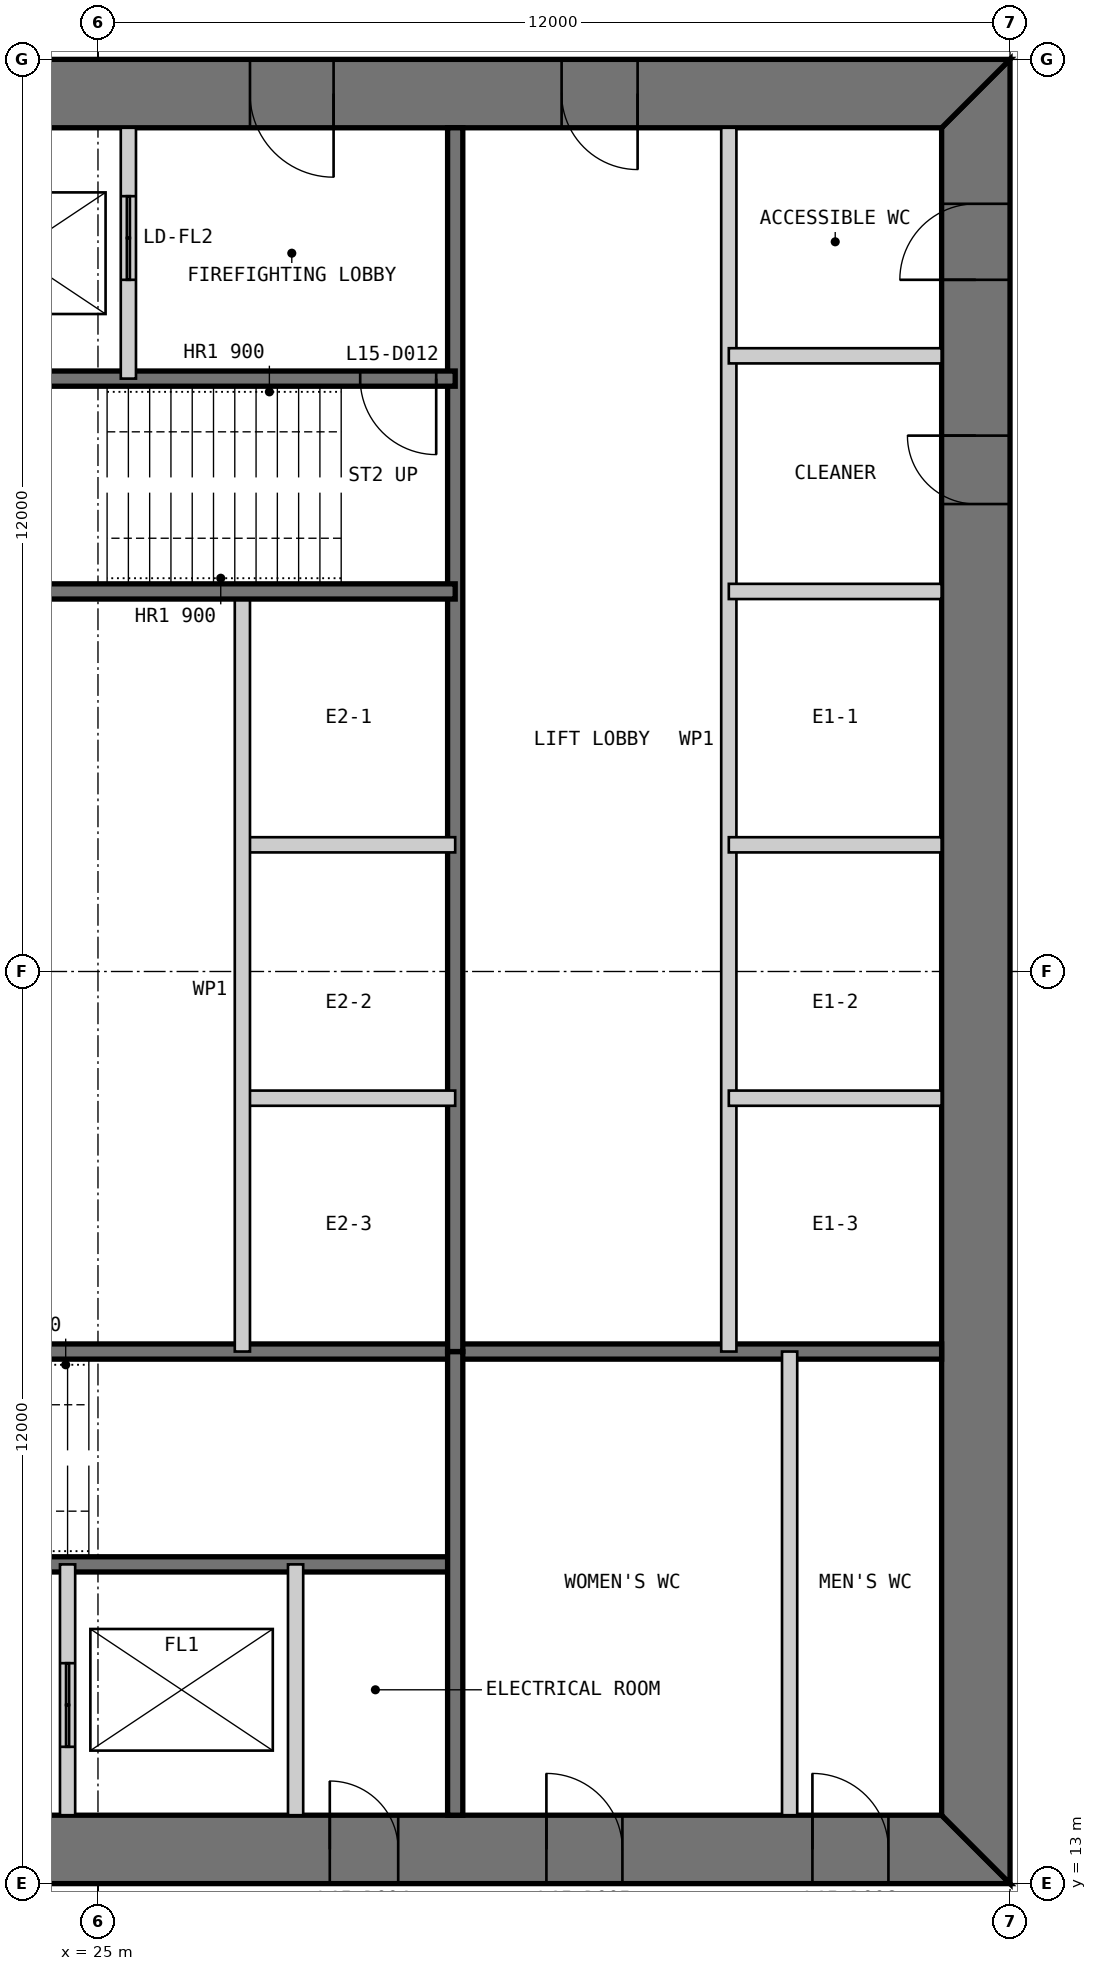
"""IFC4 building model, lengths in metres.
Left out: names, types, materials, properties, quantities, classifications, styles, units other than length and angle.
Written with IfcOpenShell. Run it as: python <this file> out.ifc"""

import sys

from ifc_helpers import new_model, si_unit, direction, frame, frame_2d, origin, place, context, subcontext, project, spatial, polyline, rectangle, outline, extrude, element, fill, save


model = new_model("IFC4")
c1 = context("Model", 3, precision=1e-05, world=origin(), true_north=direction((0.0, 1.0)))
c2 = subcontext(c1, "Body", "Model", "MODEL_VIEW")
j1 = project(units=[si_unit("LENGTHUNIT", "METRE"), si_unit("PLANEANGLEUNIT", "RADIAN")], contexts=[c1])
p1 = place(None, origin())
s1 = spatial("IfcSite", under=j1, at=p1, CompositionType="ELEMENT")
p2 = place(p1, origin())
s2 = spatial("IfcBuilding", under=s1, at=p2, CompositionType="ELEMENT")
p3 = place(p2, frame((0.0, 0.0, 67.0)))
s3 = spatial("IfcBuildingStorey", under=s2, at=p3, CompositionType="ELEMENT", Elevation=67.0)
p4 = place(p3, frame((13.0, 13.45, 0.0), z_axis=(0.0, 0.0, 1.0), x_axis=(1.0, 0.0, 0.0)))
e1 = element("IfcWall", 1, at=p4, inside=s3, PredefinedType="SHEAR", context=c2, shape_type="SweptSolid", body=[
    extrude(outline(polyline([(0.0, -0.45), (24.0, -0.45), (23.1, 0.45), (0.9, 0.45), (0.0, -0.45)])), origin(), (0.0, 0.0, 1.0), 4.0),
])
p5 = place(p4, frame((4.9, 0.0, 0.0)))
e2 = element("IfcOpeningElement", 2, at=p5, cuts=e1, PredefinedType="OPENING", context=c2, shape_type="SweptSolid", body=[
    extrude(rectangle(XDim=1.0, YDim=2.2, at=frame_2d((0.5, 1.1))), frame((0.0, 0.46, 0.0), z_axis=(0.0, -1.0, 0.0), x_axis=(1.0, 0.0, 0.0)), (0.0, 0.0, 1.0), 0.92),
])
p6 = place(p4, frame((8.9, 0.0, 0.0)))
e3 = element("IfcOpeningElement", 3, at=p6, cuts=e1, PredefinedType="OPENING", context=c2, shape_type="SweptSolid", body=[
    extrude(rectangle(XDim=1.1, YDim=2.2, at=frame_2d((0.55, 1.1))), frame((0.0, 0.46, 0.0), z_axis=(0.0, -1.0, 0.0), x_axis=(1.0, 0.0, 0.0)), (0.0, 0.0, 1.0), 0.92),
])
p7 = place(p4, frame((15.05, 0.0, 0.0)))
e4 = element("IfcOpeningElement", 4, at=p7, cuts=e1, PredefinedType="OPENING", context=c2, shape_type="SweptSolid", body=[
    extrude(rectangle(XDim=0.9, YDim=2.2, at=frame_2d((0.45, 1.1))), frame((0.0, 0.46, 0.0), z_axis=(0.0, -1.0, 0.0), x_axis=(1.0, 0.0, 0.0)), (0.0, 0.0, 1.0), 0.92),
])
p8 = place(p4, frame((17.9, 0.0, 0.0)))
e5 = element("IfcOpeningElement", 5, at=p8, cuts=e1, PredefinedType="OPENING", context=c2, shape_type="SweptSolid", body=[
    extrude(rectangle(XDim=1.0, YDim=2.2, at=frame_2d((0.5, 1.1))), frame((0.0, 0.46, 0.0), z_axis=(0.0, -1.0, 0.0), x_axis=(1.0, 0.0, 0.0)), (0.0, 0.0, 1.0), 0.92),
])
p9 = place(p4, frame((21.4, 0.0, 0.0)))
e6 = element("IfcOpeningElement", 6, at=p9, cuts=e1, PredefinedType="OPENING", context=c2, shape_type="SweptSolid", body=[
    extrude(rectangle(XDim=1.0, YDim=2.2, at=frame_2d((0.5, 1.1))), frame((0.0, 0.46, 0.0), z_axis=(0.0, -1.0, 0.0), x_axis=(1.0, 0.0, 0.0)), (0.0, 0.0, 1.0), 0.92),
])
p10 = place(p3, frame((36.55, 13.9, 0.0), z_axis=(0.0, 0.0, 1.0), x_axis=(0.0, 1.0, 0.0)))
e7 = element("IfcWall", 7, at=p10, inside=s3, PredefinedType="SHEAR", context=c2, shape_type="SweptSolid", body=[
    extrude(outline(polyline([(-0.9, -0.45), (23.1, -0.45), (22.2, 0.45), (0.0, 0.45), (-0.9, -0.45)])), origin(), (0.0, 0.0, 1.0), 4.0),
])
p11 = place(p10, frame((20.2, 0.0, 0.0)))
e8 = element("IfcOpeningElement", 8, at=p11, cuts=e7, PredefinedType="OPENING", context=c2, shape_type="SweptSolid", body=[
    extrude(rectangle(XDim=1.0, YDim=2.2, at=frame_2d((0.5, 1.1))), frame((0.0, 0.46, 0.0), z_axis=(0.0, -1.0, 0.0), x_axis=(1.0, 0.0, 0.0)), (0.0, 0.0, 1.0), 0.92),
])
p12 = place(p10, frame((17.25, 0.0, 0.0)))
e9 = element("IfcOpeningElement", 9, at=p12, cuts=e7, PredefinedType="OPENING", context=c2, shape_type="SweptSolid", body=[
    extrude(rectangle(XDim=0.9, YDim=2.2, at=frame_2d((0.45, 1.1))), frame((0.0, 0.46, 0.0), z_axis=(0.0, -1.0, 0.0), x_axis=(1.0, 0.0, 0.0)), (0.0, 0.0, 1.0), 0.92),
])
p13 = place(p3, frame((37.0, 36.55, 0.0), z_axis=(0.0, 0.0, 1.0), x_axis=(-1.0, 0.0, 0.0)))
e10 = element("IfcWall", 10, at=p13, inside=s3, PredefinedType="SHEAR", context=c2, shape_type="SweptSolid", body=[
    extrude(outline(polyline([(0.0, -0.45), (24.0, -0.45), (23.1, 0.45), (0.9, 0.45), (0.0, -0.45)])), origin(), (0.0, 0.0, 1.0), 4.0),
])
p14 = place(p13, frame((4.9, 0.0, 0.0)))
e11 = element("IfcOpeningElement", 11, at=p14, cuts=e10, PredefinedType="OPENING", context=c2, shape_type="SweptSolid", body=[
    extrude(rectangle(XDim=1.0, YDim=2.2, at=frame_2d((0.5, 1.1))), frame((0.0, 0.46, 0.0), z_axis=(0.0, -1.0, 0.0), x_axis=(1.0, 0.0, 0.0)), (0.0, 0.0, 1.0), 0.92),
])
p15 = place(p13, frame((8.9, 0.0, 0.0)))
e12 = element("IfcOpeningElement", 12, at=p15, cuts=e10, PredefinedType="OPENING", context=c2, shape_type="SweptSolid", body=[
    extrude(rectangle(XDim=1.1, YDim=2.2, at=frame_2d((0.55, 1.1))), frame((0.0, 0.46, 0.0), z_axis=(0.0, -1.0, 0.0), x_axis=(1.0, 0.0, 0.0)), (0.0, 0.0, 1.0), 0.92),
])
p16 = place(p13, frame((15.05, 0.0, 0.0)))
e13 = element("IfcOpeningElement", 13, at=p16, cuts=e10, PredefinedType="OPENING", context=c2, shape_type="SweptSolid", body=[
    extrude(rectangle(XDim=0.9, YDim=2.2, at=frame_2d((0.45, 1.1))), frame((0.0, 0.46, 0.0), z_axis=(0.0, -1.0, 0.0), x_axis=(1.0, 0.0, 0.0)), (0.0, 0.0, 1.0), 0.92),
])
p17 = place(p13, frame((17.9, 0.0, 0.0)))
e14 = element("IfcOpeningElement", 14, at=p17, cuts=e10, PredefinedType="OPENING", context=c2, shape_type="SweptSolid", body=[
    extrude(rectangle(XDim=1.0, YDim=2.2, at=frame_2d((0.5, 1.1))), frame((0.0, 0.46, 0.0), z_axis=(0.0, -1.0, 0.0), x_axis=(1.0, 0.0, 0.0)), (0.0, 0.0, 1.0), 0.92),
])
p18 = place(p13, frame((21.4, 0.0, 0.0)))
e15 = element("IfcOpeningElement", 15, at=p18, cuts=e10, PredefinedType="OPENING", context=c2, shape_type="SweptSolid", body=[
    extrude(rectangle(XDim=1.0, YDim=2.2, at=frame_2d((0.5, 1.1))), frame((0.0, 0.46, 0.0), z_axis=(0.0, -1.0, 0.0), x_axis=(1.0, 0.0, 0.0)), (0.0, 0.0, 1.0), 0.92),
])
p19 = place(p3, frame((20.3, 17.2, 0.0), z_axis=(0.0, 0.0, 1.0), x_axis=(1.0, 0.0, 0.0)))
e16 = element("IfcWall", 16, at=p19, inside=s3, PredefinedType="SOLIDWALL", context=c2, shape_type="SweptSolid", body=[
    extrude(rectangle(XDim=9.4, YDim=0.2, at=frame_2d((4.7, 0.0))), origin(), (0.0, 0.0, 1.0), 3.8),
])
p20 = place(p19, frame((0.25, 0.0, 0.0)))
e17 = element("IfcOpeningElement", 17, at=p20, cuts=e16, PredefinedType="OPENING", context=c2, shape_type="SweptSolid", body=[
    extrude(rectangle(XDim=1.0, YDim=2.2, at=frame_2d((0.5, 1.1))), frame((0.0, 0.11, 0.0), z_axis=(0.0, -1.0, 0.0), x_axis=(1.0, 0.0, 0.0)), (0.0, 0.0, 1.0), 0.22),
])
p21 = place(p3, frame((20.3, 20.0, 0.0), z_axis=(0.0, 0.0, 1.0), x_axis=(1.0, 0.0, 0.0)))
e18 = element("IfcWall", 18, at=p21, inside=s3, PredefinedType="SOLIDWALL", context=c2, shape_type="SweptSolid", body=[
    extrude(rectangle(XDim=15.8, YDim=0.2, at=frame_2d((7.9, 0.0))), origin(), (0.0, 0.0, 1.0), 3.8),
])
p22 = place(p3, frame((24.6, 13.9, 0.0), z_axis=(0.0, 0.0, 1.0), x_axis=(0.0, 1.0, 0.0)))
e19 = element("IfcWall", 19, at=p22, inside=s3, PredefinedType="PARTITIONING", context=c2, shape_type="SweptSolid", body=[
    extrude(rectangle(XDim=3.3, YDim=0.2, at=frame_2d((1.65, 0.0))), origin(), (0.0, 0.0, 1.0), 3.8),
])
p23 = place(p22, frame((0.9, 0.0, 0.0)))
e20 = element("IfcOpeningElement", 20, at=p23, cuts=e19, PredefinedType="OPENING", context=c2, shape_type="SweptSolid", body=[
    extrude(rectangle(XDim=1.1, YDim=2.2, at=frame_2d((0.55, 1.1))), frame((0.0, 0.11, 0.0), z_axis=(0.0, -1.0, 0.0), x_axis=(1.0, 0.0, 0.0)), (0.0, 0.0, 1.0), 0.22),
])
p24 = place(p3, frame((27.6, 13.9, 0.0), z_axis=(0.0, 0.0, 1.0), x_axis=(0.0, 1.0, 0.0)))
e21 = element("IfcWall", 21, at=p24, inside=s3, PredefinedType="PARTITIONING", context=c2, shape_type="SweptSolid", body=[
    extrude(rectangle(XDim=3.3, YDim=0.2, at=frame_2d((1.65, 0.0))), origin(), (0.0, 0.0, 1.0), 3.8),
])
p25 = place(p3, frame((29.7, 13.9, 0.0), z_axis=(0.0, 0.0, 1.0), x_axis=(0.0, 1.0, 0.0)))
e22 = element("IfcWall", 22, at=p25, inside=s3, PredefinedType="SOLIDWALL", context=c2, shape_type="SweptSolid", body=[
    extrude(rectangle(XDim=6.1, YDim=0.2, at=frame_2d((3.05, 0.0))), origin(), (0.0, 0.0, 1.0), 3.8),
])
p26 = place(p3, frame((34.1, 13.9, 0.0), z_axis=(0.0, 0.0, 1.0), x_axis=(0.0, 1.0, 0.0)))
e23 = element("IfcWall", 23, at=p26, inside=s3, PredefinedType="PARTITIONING", context=c2, shape_type="SweptSolid", body=[
    extrude(rectangle(XDim=6.1, YDim=0.2, at=frame_2d((3.05, 0.0))), origin(), (0.0, 0.0, 1.0), 3.8),
])
p27 = place(p3, frame((33.3, 36.1, 0.0), z_axis=(0.0, 0.0, 1.0), x_axis=(0.0, -1.0, 0.0)))
e24 = element("IfcWall", 24, at=p27, inside=s3, PredefinedType="PARTITIONING", context=c2, shape_type="SweptSolid", body=[
    extrude(rectangle(XDim=16.1, YDim=0.2, at=frame_2d((8.05, 0.0))), origin(), (0.0, 0.0, 1.0), 3.8),
])
p28 = place(p3, frame((29.7, 36.1, 0.0), z_axis=(0.0, 0.0, 1.0), x_axis=(0.0, -1.0, 0.0)))
e25 = element("IfcWall", 25, at=p28, inside=s3, PredefinedType="SOLIDWALL", context=c2, shape_type="SweptSolid", body=[
    extrude(rectangle(XDim=16.1, YDim=0.2, at=frame_2d((8.05, 0.0))), origin(), (0.0, 0.0, 1.0), 3.8),
])
for number, where, z_axis, x_axis in (
    (26, (36.1, 30.0, 0.0), (0.0, 0.0, 1.0), (-1.0, 0.0, 0.0)),
    (27, (36.1, 26.667, 0.0), (0.0, 0.0, 1.0), (-1.0, 0.0, 0.0)),
    (28, (36.1, 23.333, 0.0), (0.0, 0.0, 1.0), (-1.0, 0.0, 0.0)),
    (29, (29.7, 26.667, 0.0), (0.0, 0.0, 1.0), (-1.0, 0.0, 0.0)),
    (30, (29.7, 23.333, 0.0), (0.0, 0.0, 1.0), (-1.0, 0.0, 0.0)),
):
    element("IfcWall", number, at=place(p3, frame(where, z_axis=z_axis, x_axis=x_axis)), inside=s3, PredefinedType="PARTITIONING", context=c2, shape_type="SweptSolid", body=[
        extrude(rectangle(XDim=2.8, YDim=0.2, at=frame_2d((1.4, 0.0))), origin(), (0.0, 0.0, 1.0), 3.8),
    ])
p29 = place(p3, frame((26.9, 30.0, 0.0), z_axis=(0.0, 0.0, 1.0), x_axis=(0.0, -1.0, 0.0)))
e31 = element("IfcWall", 31, at=p29, inside=s3, PredefinedType="PARTITIONING", context=c2, shape_type="SweptSolid", body=[
    extrude(rectangle(XDim=10.0, YDim=0.2, at=frame_2d((5.0, 0.0))), origin(), (0.0, 0.0, 1.0), 3.8),
])
p30 = place(p3, frame((29.7, 32.8, 0.0), z_axis=(0.0, 0.0, 1.0), x_axis=(-1.0, 0.0, 0.0)))
e32 = element("IfcWall", 32, at=p30, inside=s3, PredefinedType="SOLIDWALL", context=c2, shape_type="SweptSolid", body=[
    extrude(rectangle(XDim=9.4, YDim=0.2, at=frame_2d((4.7, 0.0))), origin(), (0.0, 0.0, 1.0), 3.8),
])
p31 = place(p30, frame((0.25, 0.0, 0.0)))
e33 = element("IfcOpeningElement", 33, at=p31, cuts=e32, PredefinedType="OPENING", context=c2, shape_type="SweptSolid", body=[
    extrude(rectangle(XDim=1.0, YDim=2.2, at=frame_2d((0.5, 1.1))), frame((0.0, 0.11, 0.0), z_axis=(0.0, -1.0, 0.0), x_axis=(1.0, 0.0, 0.0)), (0.0, 0.0, 1.0), 0.22),
])
p32 = place(p3, frame((29.7, 30.0, 0.0), z_axis=(0.0, 0.0, 1.0), x_axis=(-1.0, 0.0, 0.0)))
e34 = element("IfcWall", 34, at=p32, inside=s3, PredefinedType="SOLIDWALL", context=c2, shape_type="SweptSolid", body=[
    extrude(rectangle(XDim=15.8, YDim=0.2, at=frame_2d((7.9, 0.0))), origin(), (0.0, 0.0, 1.0), 3.8),
])
p33 = place(p3, frame((25.4, 36.1, 0.0), z_axis=(0.0, 0.0, 1.0), x_axis=(0.0, -1.0, 0.0)))
e35 = element("IfcWall", 35, at=p33, inside=s3, PredefinedType="PARTITIONING", context=c2, shape_type="SweptSolid", body=[
    extrude(rectangle(XDim=3.3, YDim=0.2, at=frame_2d((1.65, 0.0))), origin(), (0.0, 0.0, 1.0), 3.8),
])
p34 = place(p33, frame((0.9, 0.0, 0.0)))
e36 = element("IfcOpeningElement", 36, at=p34, cuts=e35, PredefinedType="OPENING", context=c2, shape_type="SweptSolid", body=[
    extrude(rectangle(XDim=1.1, YDim=2.2, at=frame_2d((0.55, 1.1))), frame((0.0, 0.11, 0.0), z_axis=(0.0, -1.0, 0.0), x_axis=(1.0, 0.0, 0.0)), (0.0, 0.0, 1.0), 0.22),
])
p35 = place(p3, frame((36.1, 33.1, 0.0), z_axis=(0.0, 0.0, 1.0), x_axis=(-1.0, 0.0, 0.0)))
e37 = element("IfcWall", 37, at=p35, inside=s3, PredefinedType="PARTITIONING", context=c2, shape_type="SweptSolid", body=[
    extrude(rectangle(XDim=2.8, YDim=0.2, at=frame_2d((1.4, 0.0))), origin(), (0.0, 0.0, 1.0), 3.8),
])
p36 = place(p7, origin())
e38 = element("IfcDoor", 38, at=p36, inside=s3, OperationType="SINGLE_SWING_LEFT", PredefinedType="DOOR", context=c2, shape_type="SweptSolid", body=[
    extrude(rectangle(XDim=0.9, YDim=2.2, at=frame_2d((0.45, 1.1))), frame((0.0, 0.025, 0.0), z_axis=(0.0, -1.0, 0.0), x_axis=(1.0, 0.0, 0.0)), (0.0, 0.0, 1.0), 0.05),
    extrude(outline(polyline([(0.0, 0.0), (0.04, 0.0), (0.04, 2.16), (0.86, 2.16), (0.86, 0.0), (0.9, 0.0), (0.9, 2.2), (0.0, 2.2), (0.0, 0.0)])), frame((0.0, 0.3, 0.0), z_axis=(0.0, -1.0, 0.0), x_axis=(1.0, 0.0, 0.0)), (0.0, 0.0, 1.0), 0.6),
])
fill(e4, e38)
p37 = place(p8, origin())
e39 = element("IfcDoor", 39, at=p37, inside=s3, OperationType="SINGLE_SWING_LEFT", PredefinedType="DOOR", context=c2, shape_type="SweptSolid", body=[
    extrude(rectangle(XDim=1.0, YDim=2.2, at=frame_2d((0.5, 1.1))), frame((0.0, 0.025, 0.0), z_axis=(0.0, -1.0, 0.0), x_axis=(1.0, 0.0, 0.0)), (0.0, 0.0, 1.0), 0.05),
    extrude(outline(polyline([(0.0, 0.0), (0.04, 0.0), (0.04, 2.16), (0.96, 2.16), (0.96, 0.0), (1.0, 0.0), (1.0, 2.2), (0.0, 2.2), (0.0, 0.0)])), frame((0.0, 0.3, 0.0), z_axis=(0.0, -1.0, 0.0), x_axis=(1.0, 0.0, 0.0)), (0.0, 0.0, 1.0), 0.6),
])
fill(e5, e39)
p38 = place(p9, origin())
e40 = element("IfcDoor", 40, at=p38, inside=s3, OperationType="SINGLE_SWING_LEFT", PredefinedType="DOOR", context=c2, shape_type="SweptSolid", body=[
    extrude(rectangle(XDim=1.0, YDim=2.2, at=frame_2d((0.5, 1.1))), frame((0.0, 0.025, 0.0), z_axis=(0.0, -1.0, 0.0), x_axis=(1.0, 0.0, 0.0)), (0.0, 0.0, 1.0), 0.05),
    extrude(outline(polyline([(0.0, 0.0), (0.04, 0.0), (0.04, 2.16), (0.96, 2.16), (0.96, 0.0), (1.0, 0.0), (1.0, 2.2), (0.0, 2.2), (0.0, 0.0)])), frame((0.0, 0.3, 0.0), z_axis=(0.0, -1.0, 0.0), x_axis=(1.0, 0.0, 0.0)), (0.0, 0.0, 1.0), 0.6),
])
fill(e6, e40)
p39 = place(p14, origin())
e41 = element("IfcDoor", 41, at=p39, inside=s3, OperationType="SINGLE_SWING_LEFT", PredefinedType="DOOR", context=c2, shape_type="SweptSolid", body=[
    extrude(rectangle(XDim=1.0, YDim=2.2, at=frame_2d((0.5, 1.1))), frame((0.0, 0.025, 0.0), z_axis=(0.0, -1.0, 0.0), x_axis=(1.0, 0.0, 0.0)), (0.0, 0.0, 1.0), 0.05),
    extrude(outline(polyline([(0.0, 0.0), (0.04, 0.0), (0.04, 2.16), (0.96, 2.16), (0.96, 0.0), (1.0, 0.0), (1.0, 2.2), (0.0, 2.2), (0.0, 0.0)])), frame((0.0, 0.3, 0.0), z_axis=(0.0, -1.0, 0.0), x_axis=(1.0, 0.0, 0.0)), (0.0, 0.0, 1.0), 0.6),
])
fill(e11, e41)
p40 = place(p15, origin())
e42 = element("IfcDoor", 42, at=p40, inside=s3, OperationType="SINGLE_SWING_LEFT", PredefinedType="DOOR", context=c2, shape_type="SweptSolid", body=[
    extrude(rectangle(XDim=1.1, YDim=2.2, at=frame_2d((0.55, 1.1))), frame((0.0, 0.025, 0.0), z_axis=(0.0, -1.0, 0.0), x_axis=(1.0, 0.0, 0.0)), (0.0, 0.0, 1.0), 0.05),
    extrude(outline(polyline([(0.0, 0.0), (0.04, 0.0), (0.04, 2.16), (1.06, 2.16), (1.06, 0.0), (1.1, 0.0), (1.1, 2.2), (0.0, 2.2), (0.0, 0.0)])), frame((0.0, 0.3, 0.0), z_axis=(0.0, -1.0, 0.0), x_axis=(1.0, 0.0, 0.0)), (0.0, 0.0, 1.0), 0.6),
])
fill(e12, e42)
p41 = place(p31, origin())
e43 = element("IfcDoor", 43, at=p41, inside=s3, OperationType="SINGLE_SWING_LEFT", PredefinedType="DOOR", context=c2, shape_type="SweptSolid", body=[
    extrude(rectangle(XDim=1.0, YDim=2.2, at=frame_2d((0.5, 1.1))), frame((0.0, 0.025, 0.0), z_axis=(0.0, -1.0, 0.0), x_axis=(1.0, 0.0, 0.0)), (0.0, 0.0, 1.0), 0.05),
])
fill(e33, e43)
p42 = place(p11, origin())
e44 = element("IfcDoor", 44, at=p42, inside=s3, OperationType="SINGLE_SWING_LEFT", PredefinedType="DOOR", context=c2, shape_type="SweptSolid", body=[
    extrude(rectangle(XDim=1.0, YDim=2.2, at=frame_2d((0.5, 1.1))), frame((0.0, 0.025, 0.0), z_axis=(0.0, -1.0, 0.0), x_axis=(1.0, 0.0, 0.0)), (0.0, 0.0, 1.0), 0.05),
    extrude(outline(polyline([(0.0, 0.0), (0.04, 0.0), (0.04, 2.16), (0.96, 2.16), (0.96, 0.0), (1.0, 0.0), (1.0, 2.2), (0.0, 2.2), (0.0, 0.0)])), frame((0.0, 0.3, 0.0), z_axis=(0.0, -1.0, 0.0), x_axis=(1.0, 0.0, 0.0)), (0.0, 0.0, 1.0), 0.6),
])
fill(e8, e44)
p43 = place(p12, origin())
e45 = element("IfcDoor", 45, at=p43, inside=s3, OperationType="SINGLE_SWING_RIGHT", PredefinedType="DOOR", context=c2, shape_type="SweptSolid", body=[
    extrude(rectangle(XDim=0.9, YDim=2.2, at=frame_2d((0.45, 1.1))), frame((0.0, 0.025, 0.0), z_axis=(0.0, -1.0, 0.0), x_axis=(1.0, 0.0, 0.0)), (0.0, 0.0, 1.0), 0.05),
    extrude(outline(polyline([(0.0, 0.0), (0.04, 0.0), (0.04, 2.16), (0.86, 2.16), (0.86, 0.0), (0.9, 0.0), (0.9, 2.2), (0.0, 2.2), (0.0, 0.0)])), frame((0.0, 0.3, 0.0), z_axis=(0.0, -1.0, 0.0), x_axis=(1.0, 0.0, 0.0)), (0.0, 0.0, 1.0), 0.6),
])
fill(e9, e45)
p44 = place(p23, origin())
e46 = element("IfcDoor", 46, at=p44, inside=s3, OperationType="DOUBLE_DOOR_SLIDING", PredefinedType="DOOR", context=c2, shape_type="SweptSolid", body=[
    extrude(rectangle(XDim=1.1, YDim=2.2, at=frame_2d((0.55, 1.1))), frame((0.0, 0.025, 0.0), z_axis=(0.0, -1.0, 0.0), x_axis=(1.0, 0.0, 0.0)), (0.0, 0.0, 1.0), 0.05),
])
fill(e20, e46)
p45 = place(p34, origin())
e47 = element("IfcDoor", 47, at=p45, inside=s3, OperationType="DOUBLE_DOOR_SLIDING", PredefinedType="DOOR", context=c2, shape_type="SweptSolid", body=[
    extrude(rectangle(XDim=1.1, YDim=2.2, at=frame_2d((0.55, 1.1))), frame((0.0, 0.025, 0.0), z_axis=(0.0, -1.0, 0.0), x_axis=(1.0, 0.0, 0.0)), (0.0, 0.0, 1.0), 0.05),
])
fill(e36, e47)
save(model, sys.argv[1])
